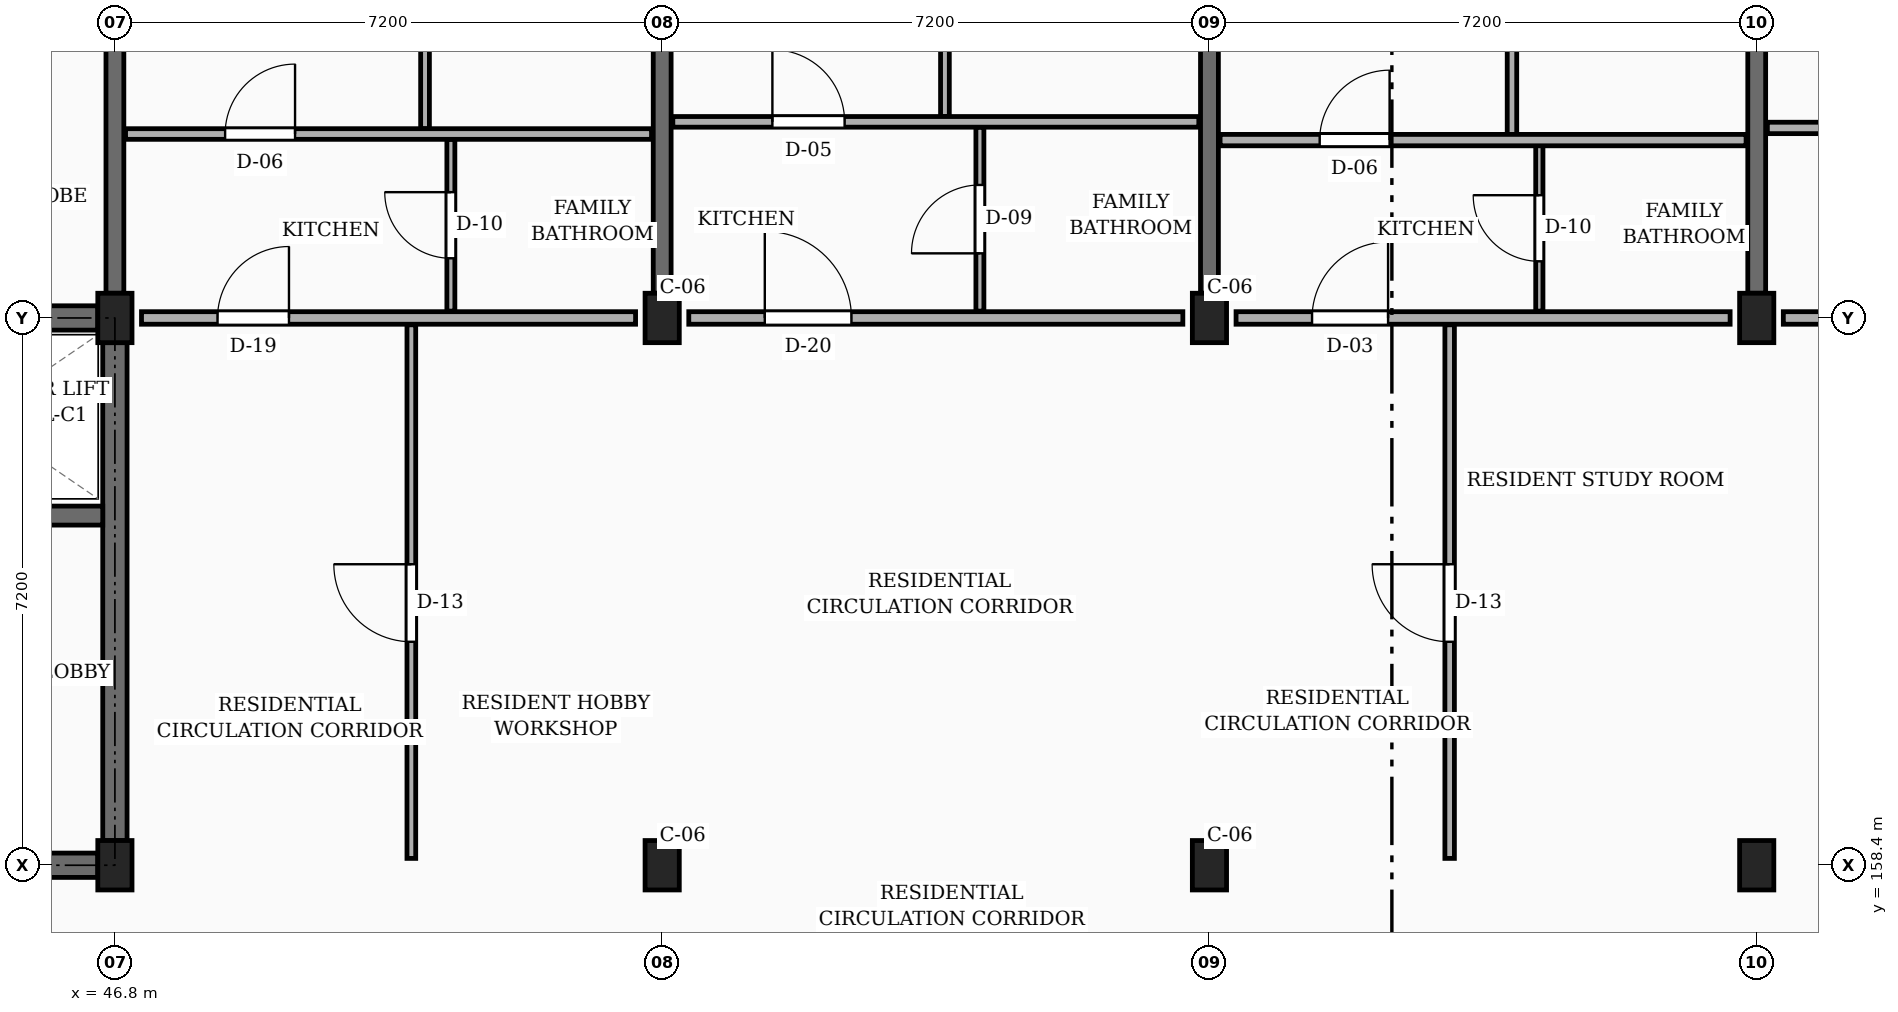
"""IFC4 building model, lengths in metres.
Left out: names, types, materials, properties, quantities, classifications, styles, units other than length and angle.
Written with IfcOpenShell. Run it as: python <this file> out.ifc"""

import sys

from ifc_helpers import new_model, si_unit, direction, frame, frame_2d, origin, origin_2d, place, context, subcontext, project, spatial, rectangle, extrude, element, fill, save


model = new_model("IFC4")
c1 = context("Model", 3, precision=1e-05, world=origin(), true_north=direction((0.0, 1.0)))
c2 = subcontext(c1, "Body", "Model", "MODEL_VIEW")
j1 = project(units=[si_unit("LENGTHUNIT", "METRE"), si_unit("PLANEANGLEUNIT", "RADIAN")], contexts=[c1])
p1 = place(None, origin())
s1 = spatial("IfcSite", under=j1, at=p1, CompositionType="ELEMENT")
p2 = place(p1, origin())
s2 = spatial("IfcBuilding", under=s1, at=p2, CompositionType="ELEMENT")
p3 = place(p2, frame((0.0, 0.0, 20.25)))
s3 = spatial("IfcBuildingStorey", under=s2, at=p3, CompositionType="ELEMENT", Elevation=20.25)
for number, where, z_axis, x_axis in (
    (1, (46.8, 158.4, 0.0), (0.0, 0.0, 1.0), (1.0, 0.0, 0.0)),
    (2, (46.8, 165.6, 0.0), (0.0, 0.0, 1.0), (1.0, 0.0, 0.0)),
    (3, (54.0, 158.4, 0.0), (0.0, 0.0, 1.0), (1.0, 0.0, 0.0)),
    (4, (54.0, 165.6, 0.0), (0.0, 0.0, 1.0), (1.0, 0.0, 0.0)),
    (5, (61.2, 158.4, 0.0), (0.0, 0.0, 1.0), (1.0, 0.0, 0.0)),
    (6, (61.2, 165.6, 0.0), (0.0, 0.0, 1.0), (1.0, 0.0, 0.0)),
    (7, (68.4, 158.4, 0.0), (0.0, 0.0, 1.0), (1.0, 0.0, 0.0)),
    (8, (68.4, 165.6, 0.0), (0.0, 0.0, 1.0), (1.0, 0.0, 0.0)),
):
    element("IfcColumn", number, at=place(p3, frame(where, z_axis=z_axis, x_axis=x_axis)), inside=s3, PredefinedType="COLUMN", context=c2, shape_type="SweptSolid", body=[
        extrude(rectangle(XDim=0.45, YDim=0.65, at=origin_2d()), origin(), (0.0, 0.0, 1.0), 3.15),
    ])
for number, where, z_axis, x_axis in (
    (9, (46.8, 165.925, 0.0), (0.0, 0.0, 1.0), (0.0, 1.0, 0.0)),
    (10, (54.0, 165.925, 0.0), (0.0, 0.0, 1.0), (0.0, 1.0, 0.0)),
    (11, (61.2, 165.925, 0.0), (0.0, 0.0, 1.0), (0.0, 1.0, 0.0)),
    (12, (68.4, 165.925, 0.0), (0.0, 0.0, 1.0), (0.0, 1.0, 0.0)),
):
    element("IfcWall", number, at=place(p3, frame(where, z_axis=z_axis, x_axis=x_axis)), inside=s3, PredefinedType="SOLIDWALL", context=c2, shape_type="SweptSolid", body=[
        extrude(rectangle(XDim=6.6, YDim=0.235, at=frame_2d((3.3, 0.0))), origin(), (0.0, 0.0, 1.0), 2.185),
    ])
p4 = place(p3, frame((39.825, 165.6, 0.0), z_axis=(0.0, 0.0, 1.0), x_axis=(1.0, 0.0, 0.0)))
e13 = element("IfcWall", 13, at=p4, inside=s3, PredefinedType="SHEAR", context=c2, shape_type="SweptSolid", body=[
    extrude(rectangle(XDim=6.75, YDim=0.32, at=frame_2d((3.375, 0.0))), origin(), (0.0, 0.0, 1.0), 2.885),
])
p5 = place(p3, frame((46.8, 158.725, 0.0), z_axis=(0.0, 0.0, 1.0), x_axis=(0.0, 1.0, 0.0)))
e14 = element("IfcWall", 14, at=p5, inside=s3, PredefinedType="SHEAR", context=c2, shape_type="SweptSolid", body=[
    extrude(rectangle(XDim=6.55, YDim=0.32, at=frame_2d((3.275, 0.0))), origin(), (0.0, 0.0, 1.0), 2.885),
])
p6 = place(p3, frame((39.825, 158.4, 0.0), z_axis=(0.0, 0.0, 1.0), x_axis=(1.0, 0.0, 0.0)))
e15 = element("IfcWall", 15, at=p6, inside=s3, PredefinedType="SHEAR", context=c2, shape_type="SweptSolid", body=[
    extrude(rectangle(XDim=6.75, YDim=0.32, at=frame_2d((3.375, 0.0))), origin(), (0.0, 0.0, 1.0), 2.885),
])
p7 = place(p6, frame((4.525, 0.0, 0.0)))
e16 = element("IfcOpeningElement", 16, at=p7, cuts=e15, PredefinedType="OPENING", context=c2, shape_type="SweptSolid", body=[
    extrude(rectangle(XDim=1.1, YDim=2.15, at=frame_2d((0.55, 1.075))), frame((0.0, 0.17, 0.0), z_axis=(0.0, -1.0, 0.0), x_axis=(1.0, 0.0, 0.0)), (0.0, 0.0, 1.0), 0.34),
])
p8 = place(p3, frame((43.325, 163.0, 0.0), z_axis=(0.0, 0.0, 1.0), x_axis=(1.0, 0.0, 0.0)))
e17 = element("IfcWall", 17, at=p8, inside=s3, PredefinedType="SHEAR", context=c2, shape_type="SweptSolid", body=[
    extrude(rectangle(XDim=3.315, YDim=0.25, at=frame_2d((1.657, 0.0))), origin(), (0.0, 0.0, 1.0), 2.885),
])
p9 = place(p8, frame((1.1, 0.0, 0.0)))
e18 = element("IfcOpeningElement", 18, at=p9, cuts=e17, PredefinedType="OPENING", context=c2, shape_type="SweptSolid", body=[
    extrude(rectangle(XDim=1.0, YDim=2.2, at=frame_2d((0.5, 1.1))), frame((0.0, 0.135, 0.0), z_axis=(0.0, -1.0, 0.0), x_axis=(1.0, 0.0, 0.0)), (0.0, 0.0, 1.0), 0.27),
])
p10 = place(p3, frame((47.15, 165.6, 0.0), z_axis=(0.0, 0.0, 1.0), x_axis=(1.0, 0.0, 0.0)))
e19 = element("IfcWall", 19, at=p10, inside=s3, PredefinedType="PARTITIONING", context=c2, shape_type="SweptSolid", body=[
    extrude(rectangle(XDim=6.5, YDim=0.165, at=frame_2d((3.25, 0.0))), origin(), (0.0, 0.0, 1.0), 2.32),
])
p11 = place(p10, frame((1.0, 0.0, 0.0)))
e20 = element("IfcOpeningElement", 20, at=p11, cuts=e19, PredefinedType="OPENING", context=c2, shape_type="SweptSolid", body=[
    extrude(rectangle(XDim=0.94, YDim=2.12, at=frame_2d((0.47, 1.06))), frame((0.0, 0.093, 0.0), z_axis=(0.0, -1.0, 0.0), x_axis=(1.0, 0.0, 0.0)), (0.0, 0.0, 1.0), 0.185),
])
p12 = place(p3, frame((54.35, 165.6, 0.0), z_axis=(0.0, 0.0, 1.0), x_axis=(1.0, 0.0, 0.0)))
e21 = element("IfcWall", 21, at=p12, inside=s3, PredefinedType="PARTITIONING", context=c2, shape_type="SweptSolid", body=[
    extrude(rectangle(XDim=6.5, YDim=0.165, at=frame_2d((3.25, 0.0))), origin(), (0.0, 0.0, 1.0), 2.32),
])
p13 = place(p12, frame((1.0, 0.0, 0.0)))
e22 = element("IfcOpeningElement", 22, at=p13, cuts=e21, PredefinedType="OPENING", context=c2, shape_type="SweptSolid", body=[
    extrude(rectangle(XDim=1.14, YDim=2.18, at=frame_2d((0.57, 1.09))), frame((0.0, 0.093, 0.0), z_axis=(0.0, -1.0, 0.0), x_axis=(1.0, 0.0, 0.0)), (0.0, 0.0, 1.0), 0.185),
])
p14 = place(p3, frame((61.55, 165.6, 0.0), z_axis=(0.0, 0.0, 1.0), x_axis=(1.0, 0.0, 0.0)))
e23 = element("IfcWall", 23, at=p14, inside=s3, PredefinedType="PARTITIONING", context=c2, shape_type="SweptSolid", body=[
    extrude(rectangle(XDim=6.5, YDim=0.165, at=frame_2d((3.25, 0.0))), origin(), (0.0, 0.0, 1.0), 2.32),
])
p15 = place(p14, frame((1.0, 0.0, 0.0)))
e24 = element("IfcOpeningElement", 24, at=p15, cuts=e23, PredefinedType="OPENING", context=c2, shape_type="SweptSolid", body=[
    extrude(rectangle(XDim=1.0, YDim=2.15, at=frame_2d((0.5, 1.075))), frame((0.0, 0.093, 0.0), z_axis=(0.0, -1.0, 0.0), x_axis=(1.0, 0.0, 0.0)), (0.0, 0.0, 1.0), 0.185),
])
p16 = place(p3, frame((68.75, 165.6, 0.0), z_axis=(0.0, 0.0, 1.0), x_axis=(1.0, 0.0, 0.0)))
e25 = element("IfcWall", 25, at=p16, inside=s3, PredefinedType="PARTITIONING", context=c2, shape_type="SweptSolid", body=[
    extrude(rectangle(XDim=6.5, YDim=0.165, at=frame_2d((3.25, 0.0))), origin(), (0.0, 0.0, 1.0), 2.32),
])
p17 = place(p16, frame((1.0, 0.0, 0.0)))
e26 = element("IfcOpeningElement", 26, at=p17, cuts=e25, PredefinedType="OPENING", context=c2, shape_type="SweptSolid", body=[
    extrude(rectangle(XDim=0.94, YDim=2.12, at=frame_2d((0.47, 1.06))), frame((0.0, 0.093, 0.0), z_axis=(0.0, -1.0, 0.0), x_axis=(1.0, 0.0, 0.0)), (0.0, 0.0, 1.0), 0.185),
])
p18 = place(p3, frame((50.7, 158.49, 0.0), z_axis=(0.0, 0.0, 1.0), x_axis=(0.0, 1.0, 0.0)))
e27 = element("IfcWall", 27, at=p18, inside=s3, PredefinedType="PARTITIONING", context=c2, shape_type="SweptSolid", body=[
    extrude(rectangle(XDim=7.02, YDim=0.115, at=frame_2d((3.51, 0.0))), origin(), (0.0, 0.0, 1.0), 2.32),
])
p19 = place(p18, frame((2.85, 0.0, 0.0)))
e28 = element("IfcOpeningElement", 28, at=p19, cuts=e27, PredefinedType="OPENING", context=c2, shape_type="SweptSolid", body=[
    extrude(rectangle(XDim=1.02, YDim=2.15, at=frame_2d((0.51, 1.075))), frame((0.0, 0.067, 0.0), z_axis=(0.0, -1.0, 0.0), x_axis=(1.0, 0.0, 0.0)), (0.0, 0.0, 1.0), 0.135),
])
p20 = place(p3, frame((50.88, 168.09, 0.0), z_axis=(0.0, 0.0, 1.0), x_axis=(0.0, 1.0, 0.0)))
e29 = element("IfcWall", 29, at=p20, inside=s3, PredefinedType="PARTITIONING", context=c2, shape_type="SweptSolid", body=[
    extrude(rectangle(XDim=4.535, YDim=0.115, at=frame_2d((2.268, 0.0))), origin(), (0.0, 0.0, 1.0), 2.32),
])
p21 = place(p20, frame((1.827, 0.0, 0.0)))
e30 = element("IfcOpeningElement", 30, at=p21, cuts=e29, PredefinedType="OPENING", context=c2, shape_type="SweptSolid", body=[
    extrude(rectangle(XDim=0.88, YDim=2.08, at=frame_2d((0.44, 1.04))), frame((0.0, 0.067, 0.0), z_axis=(0.0, -1.0, 0.0), x_axis=(1.0, 0.0, 0.0)), (0.0, 0.0, 1.0), 0.135),
])
p22 = place(p3, frame((51.22, 165.69, 0.0), z_axis=(0.0, 0.0, 1.0), x_axis=(0.0, 1.0, 0.0)))
e31 = element("IfcWall", 31, at=p22, inside=s3, PredefinedType="PARTITIONING", context=c2, shape_type="SweptSolid", body=[
    extrude(rectangle(XDim=2.26, YDim=0.105, at=frame_2d((1.13, 0.0))), origin(), (0.0, 0.0, 1.0), 2.32),
])
p23 = place(p22, frame((0.695, 0.0, 0.0)))
e32 = element("IfcOpeningElement", 32, at=p23, cuts=e31, PredefinedType="OPENING", context=c2, shape_type="SweptSolid", body=[
    extrude(rectangle(XDim=0.87, YDim=2.05, at=frame_2d((0.435, 1.025))), frame((0.0, 0.062, 0.0), z_axis=(0.0, -1.0, 0.0), x_axis=(1.0, 0.0, 0.0)), (0.0, 0.0, 1.0), 0.125),
])
p24 = place(p3, frame((46.94, 168.02, 0.0), z_axis=(0.0, 0.0, 1.0), x_axis=(1.0, 0.0, 0.0)))
e33 = element("IfcWall", 33, at=p24, inside=s3, PredefinedType="PARTITIONING", context=c2, shape_type="SweptSolid", body=[
    extrude(rectangle(XDim=6.92, YDim=0.14, at=frame_2d((3.46, 0.0))), origin(), (0.0, 0.0, 1.0), 2.32),
])
p25 = place(p24, frame((1.31, 0.0, 0.0)))
e34 = element("IfcOpeningElement", 34, at=p25, cuts=e33, PredefinedType="OPENING", context=c2, shape_type="SweptSolid", body=[
    extrude(rectangle(XDim=0.92, YDim=2.1, at=frame_2d((0.46, 1.05))), frame((0.0, 0.08, 0.0), z_axis=(0.0, -1.0, 0.0), x_axis=(1.0, 0.0, 0.0)), (0.0, 0.0, 1.0), 0.16),
])
p26 = place(p3, frame((57.72, 168.25, 0.0), z_axis=(0.0, 0.0, 1.0), x_axis=(0.0, 1.0, 0.0)))
e35 = element("IfcWall", 35, at=p26, inside=s3, PredefinedType="PARTITIONING", context=c2, shape_type="SweptSolid", body=[
    extrude(rectangle(XDim=4.375, YDim=0.115, at=frame_2d((2.188, 0.0))), origin(), (0.0, 0.0, 1.0), 2.32),
])
p27 = place(p26, frame((1.738, 0.0, 0.0)))
e36 = element("IfcOpeningElement", 36, at=p27, cuts=e35, PredefinedType="OPENING", context=c2, shape_type="SweptSolid", body=[
    extrude(rectangle(XDim=0.9, YDim=2.1, at=frame_2d((0.45, 1.05))), frame((0.0, 0.067, 0.0), z_axis=(0.0, -1.0, 0.0), x_axis=(1.0, 0.0, 0.0)), (0.0, 0.0, 1.0), 0.135),
])
p28 = place(p3, frame((58.18, 165.69, 0.0), z_axis=(0.0, 0.0, 1.0), x_axis=(0.0, 1.0, 0.0)))
e37 = element("IfcWall", 37, at=p28, inside=s3, PredefinedType="PARTITIONING", context=c2, shape_type="SweptSolid", body=[
    extrude(rectangle(XDim=2.42, YDim=0.105, at=frame_2d((1.21, 0.0))), origin(), (0.0, 0.0, 1.0), 2.32),
])
p29 = place(p28, frame((0.76, 0.0, 0.0)))
e38 = element("IfcOpeningElement", 38, at=p29, cuts=e37, PredefinedType="OPENING", context=c2, shape_type="SweptSolid", body=[
    extrude(rectangle(XDim=0.9, YDim=2.05, at=frame_2d((0.45, 1.025))), frame((0.0, 0.062, 0.0), z_axis=(0.0, -1.0, 0.0), x_axis=(1.0, 0.0, 0.0)), (0.0, 0.0, 1.0), 0.125),
])
p30 = place(p3, frame((54.14, 168.18, 0.0), z_axis=(0.0, 0.0, 1.0), x_axis=(1.0, 0.0, 0.0)))
e39 = element("IfcWall", 39, at=p30, inside=s3, PredefinedType="PARTITIONING", context=c2, shape_type="SweptSolid", body=[
    extrude(rectangle(XDim=6.92, YDim=0.14, at=frame_2d((3.46, 0.0))), origin(), (0.0, 0.0, 1.0), 2.32),
])
p31 = place(p30, frame((1.31, 0.0, 0.0)))
e40 = element("IfcOpeningElement", 40, at=p31, cuts=e39, PredefinedType="OPENING", context=c2, shape_type="SweptSolid", body=[
    extrude(rectangle(XDim=0.95, YDim=2.1, at=frame_2d((0.475, 1.05))), frame((0.0, 0.08, 0.0), z_axis=(0.0, -1.0, 0.0), x_axis=(1.0, 0.0, 0.0)), (0.0, 0.0, 1.0), 0.16),
])
p32 = place(p3, frame((64.36, 158.49, 0.0), z_axis=(0.0, 0.0, 1.0), x_axis=(0.0, 1.0, 0.0)))
e41 = element("IfcWall", 41, at=p32, inside=s3, PredefinedType="PARTITIONING", context=c2, shape_type="SweptSolid", body=[
    extrude(rectangle(XDim=7.02, YDim=0.125, at=frame_2d((3.51, 0.0))), origin(), (0.0, 0.0, 1.0), 2.32),
])
p33 = place(p32, frame((2.85, 0.0, 0.0)))
e42 = element("IfcOpeningElement", 42, at=p33, cuts=e41, PredefinedType="OPENING", context=c2, shape_type="SweptSolid", body=[
    extrude(rectangle(XDim=1.02, YDim=2.15, at=frame_2d((0.51, 1.075))), frame((0.0, 0.073, 0.0), z_axis=(0.0, -1.0, 0.0), x_axis=(1.0, 0.0, 0.0)), (0.0, 0.0, 1.0), 0.145),
])
p34 = place(p3, frame((65.18, 168.01, 0.0), z_axis=(0.0, 0.0, 1.0), x_axis=(0.0, 1.0, 0.0)))
e43 = element("IfcWall", 43, at=p34, inside=s3, PredefinedType="PARTITIONING", context=c2, shape_type="SweptSolid", body=[
    extrude(rectangle(XDim=4.615, YDim=0.125, at=frame_2d((2.308, 0.0))), origin(), (0.0, 0.0, 1.0), 2.32),
])
p35 = place(p34, frame((1.867, 0.0, 0.0)))
e44 = element("IfcOpeningElement", 44, at=p35, cuts=e43, PredefinedType="OPENING", context=c2, shape_type="SweptSolid", body=[
    extrude(rectangle(XDim=0.88, YDim=2.08, at=frame_2d((0.44, 1.04))), frame((0.0, 0.073, 0.0), z_axis=(0.0, -1.0, 0.0), x_axis=(1.0, 0.0, 0.0)), (0.0, 0.0, 1.0), 0.145),
])
p36 = place(p3, frame((65.54, 165.69, 0.0), z_axis=(0.0, 0.0, 1.0), x_axis=(0.0, 1.0, 0.0)))
e45 = element("IfcWall", 45, at=p36, inside=s3, PredefinedType="PARTITIONING", context=c2, shape_type="SweptSolid", body=[
    extrude(rectangle(XDim=2.18, YDim=0.095, at=frame_2d((1.09, 0.0))), origin(), (0.0, 0.0, 1.0), 2.32),
])
p37 = place(p36, frame((0.655, 0.0, 0.0)))
e46 = element("IfcOpeningElement", 46, at=p37, cuts=e45, PredefinedType="OPENING", context=c2, shape_type="SweptSolid", body=[
    extrude(rectangle(XDim=0.87, YDim=2.05, at=frame_2d((0.435, 1.025))), frame((0.0, 0.058, 0.0), z_axis=(0.0, -1.0, 0.0), x_axis=(1.0, 0.0, 0.0)), (0.0, 0.0, 1.0), 0.115),
])
p38 = place(p3, frame((61.34, 167.94, 0.0), z_axis=(0.0, 0.0, 1.0), x_axis=(1.0, 0.0, 0.0)))
e47 = element("IfcWall", 47, at=p38, inside=s3, PredefinedType="PARTITIONING", context=c2, shape_type="SweptSolid", body=[
    extrude(rectangle(XDim=6.92, YDim=0.15, at=frame_2d((3.46, 0.0))), origin(), (0.0, 0.0, 1.0), 2.32),
])
p39 = place(p38, frame((1.31, 0.0, 0.0)))
e48 = element("IfcOpeningElement", 48, at=p39, cuts=e47, PredefinedType="OPENING", context=c2, shape_type="SweptSolid", body=[
    extrude(rectangle(XDim=0.92, YDim=2.1, at=frame_2d((0.46, 1.05))), frame((0.0, 0.085, 0.0), z_axis=(0.0, -1.0, 0.0), x_axis=(1.0, 0.0, 0.0)), (0.0, 0.0, 1.0), 0.17),
])
p40 = place(p3, frame((68.54, 168.1, 0.0), z_axis=(0.0, 0.0, 1.0), x_axis=(1.0, 0.0, 0.0)))
e49 = element("IfcWall", 49, at=p40, inside=s3, PredefinedType="PARTITIONING", context=c2, shape_type="SweptSolid", body=[
    extrude(rectangle(XDim=6.885, YDim=0.15, at=frame_2d((3.442, 0.0))), origin(), (0.0, 0.0, 1.0), 2.32),
])
p41 = place(p40, frame((1.31, 0.0, 0.0)))
e50 = element("IfcOpeningElement", 50, at=p41, cuts=e49, PredefinedType="OPENING", context=c2, shape_type="SweptSolid", body=[
    extrude(rectangle(XDim=0.95, YDim=2.1, at=frame_2d((0.475, 1.05))), frame((0.0, 0.085, 0.0), z_axis=(0.0, -1.0, 0.0), x_axis=(1.0, 0.0, 0.0)), (0.0, 0.0, 1.0), 0.17),
])
p42 = place(p11, origin())
e51 = element("IfcDoor", 51, at=p42, inside=s3, OperationType="SINGLE_SWING_RIGHT", PredefinedType="DOOR", context=c2, shape_type="SweptSolid", body=[
    extrude(rectangle(XDim=0.94, YDim=2.12, at=frame_2d((0.47, 1.06))), frame((0.0, 0.025, 0.0), z_axis=(0.0, -1.0, 0.0), x_axis=(1.0, 0.0, 0.0)), (0.0, 0.0, 1.0), 0.05),
])
fill(e20, e51)
p43 = place(p13, origin())
e52 = element("IfcDoor", 52, at=p43, inside=s3, OperationType="SINGLE_SWING_LEFT", PredefinedType="DOOR", context=c2, shape_type="SweptSolid", body=[
    extrude(rectangle(XDim=1.14, YDim=2.18, at=frame_2d((0.57, 1.09))), frame((0.0, 0.025, 0.0), z_axis=(0.0, -1.0, 0.0), x_axis=(1.0, 0.0, 0.0)), (0.0, 0.0, 1.0), 0.05),
])
fill(e22, e52)
p44 = place(p15, origin())
e53 = element("IfcDoor", 53, at=p44, inside=s3, OperationType="SINGLE_SWING_RIGHT", PredefinedType="DOOR", context=c2, shape_type="SweptSolid", body=[
    extrude(rectangle(XDim=1.0, YDim=2.15, at=frame_2d((0.5, 1.075))), frame((0.0, 0.025, 0.0), z_axis=(0.0, -1.0, 0.0), x_axis=(1.0, 0.0, 0.0)), (0.0, 0.0, 1.0), 0.05),
])
fill(e24, e53)
p45 = place(p19, origin())
e54 = element("IfcDoor", 54, at=p45, inside=s3, OperationType="SINGLE_SWING_RIGHT", PredefinedType="DOOR", context=c2, shape_type="SweptSolid", body=[
    extrude(rectangle(XDim=1.02, YDim=2.15, at=frame_2d((0.51, 1.075))), frame((0.0, 0.025, 0.0), z_axis=(0.0, -1.0, 0.0), x_axis=(1.0, 0.0, 0.0)), (0.0, 0.0, 1.0), 0.05),
])
fill(e28, e54)
p46 = place(p23, origin())
e55 = element("IfcDoor", 55, at=p46, inside=s3, OperationType="SINGLE_SWING_RIGHT", PredefinedType="DOOR", context=c2, shape_type="SweptSolid", body=[
    extrude(rectangle(XDim=0.87, YDim=2.05, at=frame_2d((0.435, 1.025))), frame((0.0, 0.025, 0.0), z_axis=(0.0, -1.0, 0.0), x_axis=(1.0, 0.0, 0.0)), (0.0, 0.0, 1.0), 0.05),
])
fill(e32, e55)
p47 = place(p25, origin())
e56 = element("IfcDoor", 56, at=p47, inside=s3, OperationType="SINGLE_SWING_RIGHT", PredefinedType="DOOR", context=c2, shape_type="SweptSolid", body=[
    extrude(rectangle(XDim=0.92, YDim=2.1, at=frame_2d((0.46, 1.05))), frame((0.0, 0.025, 0.0), z_axis=(0.0, -1.0, 0.0), x_axis=(1.0, 0.0, 0.0)), (0.0, 0.0, 1.0), 0.05),
])
fill(e34, e56)
p48 = place(p29, origin())
e57 = element("IfcDoor", 57, at=p48, inside=s3, OperationType="SINGLE_SWING_LEFT", PredefinedType="DOOR", context=c2, shape_type="SweptSolid", body=[
    extrude(rectangle(XDim=0.9, YDim=2.05, at=frame_2d((0.45, 1.025))), frame((0.0, 0.025, 0.0), z_axis=(0.0, -1.0, 0.0), x_axis=(1.0, 0.0, 0.0)), (0.0, 0.0, 1.0), 0.05),
])
fill(e38, e57)
p49 = place(p31, origin())
e58 = element("IfcDoor", 58, at=p49, inside=s3, OperationType="SINGLE_SWING_LEFT", PredefinedType="DOOR", context=c2, shape_type="SweptSolid", body=[
    extrude(rectangle(XDim=0.95, YDim=2.1, at=frame_2d((0.475, 1.05))), frame((0.0, 0.025, 0.0), z_axis=(0.0, -1.0, 0.0), x_axis=(1.0, 0.0, 0.0)), (0.0, 0.0, 1.0), 0.05),
])
fill(e40, e58)
p50 = place(p33, origin())
e59 = element("IfcDoor", 59, at=p50, inside=s3, OperationType="SINGLE_SWING_RIGHT", PredefinedType="DOOR", context=c2, shape_type="SweptSolid", body=[
    extrude(rectangle(XDim=1.02, YDim=2.15, at=frame_2d((0.51, 1.075))), frame((0.0, 0.025, 0.0), z_axis=(0.0, -1.0, 0.0), x_axis=(1.0, 0.0, 0.0)), (0.0, 0.0, 1.0), 0.05),
])
fill(e42, e59)
p51 = place(p37, origin())
e60 = element("IfcDoor", 60, at=p51, inside=s3, OperationType="SINGLE_SWING_RIGHT", PredefinedType="DOOR", context=c2, shape_type="SweptSolid", body=[
    extrude(rectangle(XDim=0.87, YDim=2.05, at=frame_2d((0.435, 1.025))), frame((0.0, 0.025, 0.0), z_axis=(0.0, -1.0, 0.0), x_axis=(1.0, 0.0, 0.0)), (0.0, 0.0, 1.0), 0.05),
])
fill(e46, e60)
p52 = place(p39, origin())
e61 = element("IfcDoor", 61, at=p52, inside=s3, OperationType="SINGLE_SWING_RIGHT", PredefinedType="DOOR", context=c2, shape_type="SweptSolid", body=[
    extrude(rectangle(XDim=0.92, YDim=2.1, at=frame_2d((0.46, 1.05))), frame((0.0, 0.025, 0.0), z_axis=(0.0, -1.0, 0.0), x_axis=(1.0, 0.0, 0.0)), (0.0, 0.0, 1.0), 0.05),
])
fill(e48, e61)
save(model, sys.argv[1])
